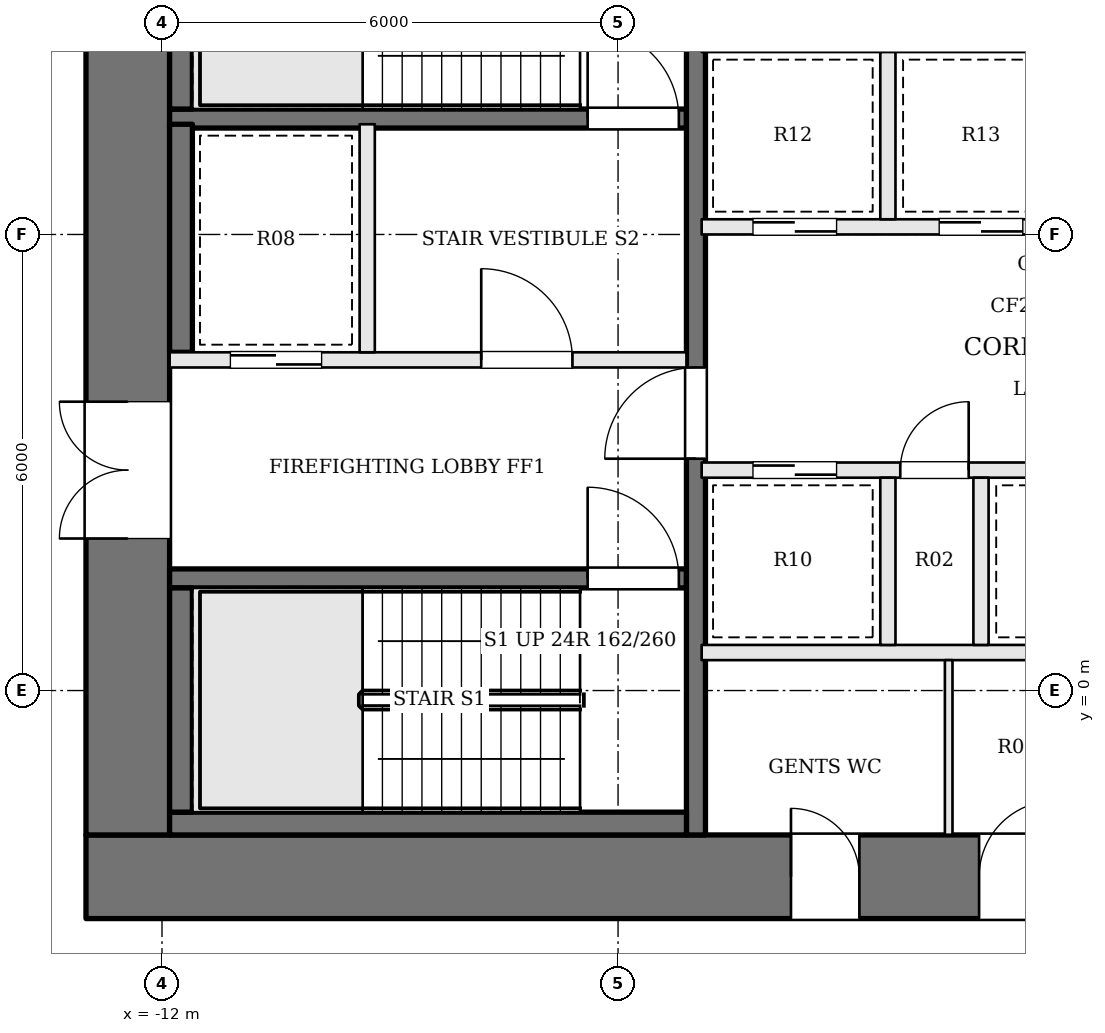
"""IFC4 building model, lengths in metres.
Left out: names, types, materials, properties, quantities, classifications, styles, units other than length and angle.
Written with IfcOpenShell. Run it as: python <this file> out.ifc"""

import sys

from ifc_helpers import new_model, si_unit, direction, frame, frame_2d, origin, place, context, subcontext, project, spatial, rectangle, extrude, element, fill, save


model = new_model("IFC4")
c1 = context("Model", 3, precision=1e-05, world=origin(), true_north=direction((0.0, 1.0)))
c2 = subcontext(c1, "Body", "Model", "MODEL_VIEW")
j1 = project(units=[si_unit("LENGTHUNIT", "METRE"), si_unit("PLANEANGLEUNIT", "RADIAN")], contexts=[c1])
p1 = place(None, origin())
s1 = spatial("IfcSite", under=j1, at=p1, CompositionType="ELEMENT")
p2 = place(p1, origin())
s2 = spatial("IfcBuilding", under=s1, at=p2, CompositionType="ELEMENT")
p3 = place(p2, frame((0.0, 0.0, 138.3)))
s3 = spatial("IfcBuildingStorey", under=s2, at=p3, CompositionType="ELEMENT", Elevation=138.3)
p4 = place(p3, frame((-13.0, -2.45, 0.0), z_axis=(0.0, 0.0, 1.0), x_axis=(1.0, 0.0, 0.0)))
e1 = element("IfcWall", 1, at=p4, inside=s3, PredefinedType="SHEAR", context=c2, shape_type="SweptSolid", body=[
    extrude(rectangle(XDim=26.0, YDim=1.1, at=frame_2d((13.0, 0.0))), origin(), (0.0, 0.0, 1.0), 3.9),
])
p5 = place(p4, frame((9.275, 0.0, 0.0)))
e2 = element("IfcOpeningElement", 2, at=p5, cuts=e1, PredefinedType="OPENING", context=c2, shape_type="SweptSolid", body=[
    extrude(rectangle(XDim=0.9, YDim=2.1, at=frame_2d((0.45, 1.05))), frame((0.0, 0.56, 0.0), z_axis=(0.0, -1.0, 0.0), x_axis=(1.0, 0.0, 0.0)), (0.0, 0.0, 1.0), 1.12),
])
p6 = place(p4, frame((11.75, 0.0, 0.0)))
e3 = element("IfcOpeningElement", 3, at=p6, cuts=e1, PredefinedType="OPENING", context=c2, shape_type="SweptSolid", body=[
    extrude(rectangle(XDim=1.0, YDim=2.1, at=frame_2d((0.5, 1.05))), frame((0.0, 0.56, 0.0), z_axis=(0.0, -1.0, 0.0), x_axis=(1.0, 0.0, 0.0)), (0.0, 0.0, 1.0), 1.12),
])
p7 = place(p4, frame((14.325, 0.0, 0.0)))
e4 = element("IfcOpeningElement", 4, at=p7, cuts=e1, PredefinedType="OPENING", context=c2, shape_type="SweptSolid", body=[
    extrude(rectangle(XDim=0.9, YDim=2.1, at=frame_2d((0.45, 1.05))), frame((0.0, 0.56, 0.0), z_axis=(0.0, -1.0, 0.0), x_axis=(1.0, 0.0, 0.0)), (0.0, 0.0, 1.0), 1.12),
])
p8 = place(p4, frame((16.7, 0.0, 0.0)))
e5 = element("IfcOpeningElement", 5, at=p8, cuts=e1, PredefinedType="OPENING", context=c2, shape_type="SweptSolid", body=[
    extrude(rectangle(XDim=0.9, YDim=2.1, at=frame_2d((0.45, 1.05))), frame((0.0, 0.56, 0.0), z_axis=(0.0, -1.0, 0.0), x_axis=(1.0, 0.0, 0.0)), (0.0, 0.0, 1.0), 1.12),
])
p9 = place(p3, frame((-12.45, -1.9, 0.0), z_axis=(0.0, 0.0, 1.0), x_axis=(0.0, 1.0, 0.0)))
e6 = element("IfcWall", 6, at=p9, inside=s3, PredefinedType="SHEAR", context=c2, shape_type="SweptSolid", body=[
    extrude(rectangle(XDim=12.8, YDim=1.1, at=frame_2d((6.4, 0.0))), origin(), (0.0, 0.0, 1.0), 3.9),
])
p10 = place(p9, frame((3.9, 0.0, 0.0)))
e7 = element("IfcOpeningElement", 7, at=p10, cuts=e6, PredefinedType="OPENING", context=c2, shape_type="SweptSolid", body=[
    extrude(rectangle(XDim=1.8, YDim=2.1, at=frame_2d((0.9, 1.05))), frame((0.0, 0.56, 0.0), z_axis=(0.0, -1.0, 0.0), x_axis=(1.0, 0.0, 0.0)), (0.0, 0.0, 1.0), 1.12),
])
p11 = place(p3, frame((-11.9, 1.475, 0.0), z_axis=(0.0, 0.0, 1.0), x_axis=(1.0, 0.0, 0.0)))
e8 = element("IfcWall", 8, at=p11, inside=s3, PredefinedType="SOLIDWALL", context=c2, shape_type="SweptSolid", body=[
    extrude(rectangle(XDim=6.8, YDim=0.25, at=frame_2d((3.4, 0.0))), origin(), (0.0, 0.0, 1.0), 3.7),
])
p12 = place(p11, frame((5.5, 0.0, 0.0)))
e9 = element("IfcOpeningElement", 9, at=p12, cuts=e8, PredefinedType="OPENING", context=c2, shape_type="SweptSolid", body=[
    extrude(rectangle(XDim=1.2, YDim=2.1, at=frame_2d((0.6, 1.05))), frame((0.0, 0.135, 0.0), z_axis=(0.0, -1.0, 0.0), x_axis=(1.0, 0.0, 0.0)), (0.0, 0.0, 1.0), 0.27),
])
p13 = place(p3, frame((-11.9, 4.35, 0.0), z_axis=(0.0, 0.0, 1.0), x_axis=(1.0, 0.0, 0.0)))
e10 = element("IfcWall", 10, at=p13, inside=s3, PredefinedType="SOLIDWALL", context=c2, shape_type="SweptSolid", body=[
    extrude(rectangle(XDim=6.8, YDim=0.2, at=frame_2d((3.4, 0.0))), origin(), (0.0, 0.0, 1.0), 3.7),
])
p14 = place(p13, frame((4.1, 0.0, 0.0)))
e11 = element("IfcOpeningElement", 11, at=p14, cuts=e10, PredefinedType="OPENING", context=c2, shape_type="SweptSolid", body=[
    extrude(rectangle(XDim=1.2, YDim=2.1, at=frame_2d((0.6, 1.05))), frame((0.0, 0.11, 0.0), z_axis=(0.0, -1.0, 0.0), x_axis=(1.0, 0.0, 0.0)), (0.0, 0.0, 1.0), 0.22),
])
p15 = place(p13, frame((0.8, 0.0, 0.0)))
e12 = element("IfcOpeningElement", 12, at=p15, cuts=e10, PredefinedType="OPENING", context=c2, shape_type="SweptSolid", body=[
    extrude(rectangle(XDim=1.2, YDim=2.1, at=frame_2d((0.6, 1.05))), frame((0.0, 0.11, 0.0), z_axis=(0.0, -1.0, 0.0), x_axis=(1.0, 0.0, 0.0)), (0.0, 0.0, 1.0), 0.22),
])
p16 = place(p3, frame((-11.9, 7.525, 0.0), z_axis=(0.0, 0.0, 1.0), x_axis=(1.0, 0.0, 0.0)))
e13 = element("IfcWall", 13, at=p16, inside=s3, PredefinedType="SOLIDWALL", context=c2, shape_type="SweptSolid", body=[
    extrude(rectangle(XDim=6.8, YDim=0.25, at=frame_2d((3.4, 0.0))), origin(), (0.0, 0.0, 1.0), 3.7),
])
p17 = place(p16, frame((5.5, 0.0, 0.0)))
e14 = element("IfcOpeningElement", 14, at=p17, cuts=e13, PredefinedType="OPENING", context=c2, shape_type="SweptSolid", body=[
    extrude(rectangle(XDim=1.2, YDim=2.1, at=frame_2d((0.6, 1.05))), frame((0.0, 0.135, 0.0), z_axis=(0.0, -1.0, 0.0), x_axis=(1.0, 0.0, 0.0)), (0.0, 0.0, 1.0), 0.27),
])
p18 = place(p3, frame((-9.3, 4.45, 0.0), z_axis=(0.0, 0.0, 1.0), x_axis=(0.0, 1.0, 0.0)))
e15 = element("IfcWall", 15, at=p18, inside=s3, PredefinedType="SOLIDWALL", context=c2, shape_type="SweptSolid", body=[
    extrude(rectangle(XDim=3.0, YDim=0.2, at=frame_2d((1.5, 0.0))), origin(), (0.0, 0.0, 1.0), 3.7),
])
p19 = place(p3, frame((-4.975, -1.9, 0.0), z_axis=(0.0, 0.0, 1.0), x_axis=(0.0, 1.0, 0.0)))
e16 = element("IfcWall", 16, at=p19, inside=s3, PredefinedType="SOLIDWALL", context=c2, shape_type="SweptSolid", body=[
    extrude(rectangle(XDim=12.8, YDim=0.25, at=frame_2d((6.4, 0.0))), origin(), (0.0, 0.0, 1.0), 3.7),
])
p20 = place(p19, frame((4.95, 0.0, 0.0)))
e17 = element("IfcOpeningElement", 17, at=p20, cuts=e16, PredefinedType="OPENING", context=c2, shape_type="SweptSolid", body=[
    extrude(rectangle(XDim=1.2, YDim=2.1, at=frame_2d((0.6, 1.05))), frame((0.0, 0.135, 0.0), z_axis=(0.0, -1.0, 0.0), x_axis=(1.0, 0.0, 0.0)), (0.0, 0.0, 1.0), 0.27),
])
p21 = place(p3, frame((-11.9, -1.75, 0.0), z_axis=(0.0, 0.0, 1.0), x_axis=(1.0, 0.0, 0.0)))
e18 = element("IfcWall", 18, at=p21, inside=s3, PredefinedType="SOLIDWALL", context=c2, shape_type="SweptSolid", body=[
    extrude(rectangle(XDim=6.8, YDim=0.3, at=frame_2d((3.4, 0.0))), origin(), (0.0, 0.0, 1.0), 3.7),
])
p22 = place(p3, frame((-11.75, -1.6, 0.0), z_axis=(0.0, 0.0, 1.0), x_axis=(0.0, 1.0, 0.0)))
e19 = element("IfcWall", 19, at=p22, inside=s3, PredefinedType="SOLIDWALL", context=c2, shape_type="SweptSolid", body=[
    extrude(rectangle(XDim=2.95, YDim=0.3, at=frame_2d((1.475, 0.0))), origin(), (0.0, 0.0, 1.0), 3.7),
])
p23 = place(p3, frame((-11.75, 4.45, 0.0), z_axis=(0.0, 0.0, 1.0), x_axis=(0.0, 1.0, 0.0)))
e20 = element("IfcWall", 20, at=p23, inside=s3, PredefinedType="SOLIDWALL", context=c2, shape_type="SweptSolid", body=[
    extrude(rectangle(XDim=3.0, YDim=0.3, at=frame_2d((1.5, 0.0))), origin(), (0.0, 0.0, 1.0), 3.7),
])
p24 = place(p3, frame((-11.75, 7.65, 0.0), z_axis=(0.0, 0.0, 1.0), x_axis=(0.0, 1.0, 0.0)))
e21 = element("IfcWall", 21, at=p24, inside=s3, PredefinedType="SOLIDWALL", context=c2, shape_type="SweptSolid", body=[
    extrude(rectangle(XDim=2.95, YDim=0.3, at=frame_2d((1.475, 0.0))), origin(), (0.0, 0.0, 1.0), 3.7),
])
p25 = place(p3, frame((-4.9, 0.5, 0.0), z_axis=(0.0, 0.0, 1.0), x_axis=(1.0, 0.0, 0.0)))
e22 = element("IfcWall", 22, at=p25, inside=s3, PredefinedType="SOLIDWALL", context=c2, shape_type="SweptSolid", body=[
    extrude(rectangle(XDim=9.8, YDim=0.2, at=frame_2d((4.9, 0.0))), origin(), (0.0, 0.0, 1.0), 3.7),
])
p26 = place(p3, frame((-4.9, 2.9, 0.0), z_axis=(0.0, 0.0, 1.0), x_axis=(1.0, 0.0, 0.0)))
e23 = element("IfcWall", 23, at=p26, inside=s3, PredefinedType="SOLIDWALL", context=c2, shape_type="SweptSolid", body=[
    extrude(rectangle(XDim=9.8, YDim=0.2, at=frame_2d((4.9, 0.0))), origin(), (0.0, 0.0, 1.0), 3.7),
])
p27 = place(p26, frame((0.675, 0.0, 0.0)))
e24 = element("IfcOpeningElement", 24, at=p27, cuts=e23, PredefinedType="OPENING", context=c2, shape_type="SweptSolid", body=[
    extrude(rectangle(XDim=1.1, YDim=2.1, at=frame_2d((0.55, 1.05))), frame((0.0, 0.11, 0.0), z_axis=(0.0, -1.0, 0.0), x_axis=(1.0, 0.0, 0.0)), (0.0, 0.0, 1.0), 0.22),
])
p28 = place(p26, frame((2.613, 0.0, 0.0)))
e25 = element("IfcOpeningElement", 25, at=p28, cuts=e23, PredefinedType="OPENING", context=c2, shape_type="SweptSolid", body=[
    extrude(rectangle(XDim=0.9, YDim=2.1, at=frame_2d((0.45, 1.05))), frame((0.0, 0.11, 0.0), z_axis=(0.0, -1.0, 0.0), x_axis=(1.0, 0.0, 0.0)), (0.0, 0.0, 1.0), 0.22),
])
p29 = place(p26, frame((4.35, 0.0, 0.0)))
e26 = element("IfcOpeningElement", 26, at=p29, cuts=e23, PredefinedType="OPENING", context=c2, shape_type="SweptSolid", body=[
    extrude(rectangle(XDim=1.1, YDim=2.1, at=frame_2d((0.55, 1.05))), frame((0.0, 0.11, 0.0), z_axis=(0.0, -1.0, 0.0), x_axis=(1.0, 0.0, 0.0)), (0.0, 0.0, 1.0), 0.22),
])
p30 = place(p26, frame((7.463, 0.0, 0.0)))
e27 = element("IfcOpeningElement", 27, at=p30, cuts=e23, PredefinedType="OPENING", context=c2, shape_type="SweptSolid", body=[
    extrude(rectangle(XDim=1.0, YDim=2.1, at=frame_2d((0.5, 1.05))), frame((0.0, 0.11, 0.0), z_axis=(0.0, -1.0, 0.0), x_axis=(1.0, 0.0, 0.0)), (0.0, 0.0, 1.0), 0.22),
])
p31 = place(p3, frame((-4.9, 6.1, 0.0), z_axis=(0.0, 0.0, 1.0), x_axis=(1.0, 0.0, 0.0)))
e28 = element("IfcWall", 28, at=p31, inside=s3, PredefinedType="SOLIDWALL", context=c2, shape_type="SweptSolid", body=[
    extrude(rectangle(XDim=9.8, YDim=0.2, at=frame_2d((4.9, 0.0))), origin(), (0.0, 0.0, 1.0), 3.7),
])
p32 = place(p31, frame((0.675, 0.0, 0.0)))
e29 = element("IfcOpeningElement", 29, at=p32, cuts=e28, PredefinedType="OPENING", context=c2, shape_type="SweptSolid", body=[
    extrude(rectangle(XDim=1.1, YDim=2.1, at=frame_2d((0.55, 1.05))), frame((0.0, 0.11, 0.0), z_axis=(0.0, -1.0, 0.0), x_axis=(1.0, 0.0, 0.0)), (0.0, 0.0, 1.0), 0.22),
])
p33 = place(p31, frame((3.125, 0.0, 0.0)))
e30 = element("IfcOpeningElement", 30, at=p33, cuts=e28, PredefinedType="OPENING", context=c2, shape_type="SweptSolid", body=[
    extrude(rectangle(XDim=1.1, YDim=2.1, at=frame_2d((0.55, 1.05))), frame((0.0, 0.11, 0.0), z_axis=(0.0, -1.0, 0.0), x_axis=(1.0, 0.0, 0.0)), (0.0, 0.0, 1.0), 0.22),
])
p34 = place(p31, frame((5.575, 0.0, 0.0)))
e31 = element("IfcOpeningElement", 31, at=p34, cuts=e28, PredefinedType="OPENING", context=c2, shape_type="SweptSolid", body=[
    extrude(rectangle(XDim=1.1, YDim=2.1, at=frame_2d((0.55, 1.05))), frame((0.0, 0.11, 0.0), z_axis=(0.0, -1.0, 0.0), x_axis=(1.0, 0.0, 0.0)), (0.0, 0.0, 1.0), 0.22),
])
p35 = place(p31, frame((8.025, 0.0, 0.0)))
e32 = element("IfcOpeningElement", 32, at=p35, cuts=e28, PredefinedType="OPENING", context=c2, shape_type="SweptSolid", body=[
    extrude(rectangle(XDim=1.1, YDim=2.1, at=frame_2d((0.55, 1.05))), frame((0.0, 0.11, 0.0), z_axis=(0.0, -1.0, 0.0), x_axis=(1.0, 0.0, 0.0)), (0.0, 0.0, 1.0), 0.22),
])
for number, where, z_axis, x_axis in (
    (33, (-2.45, 0.6, 0.0), (0.0, 0.0, 1.0), (0.0, 1.0, 0.0)),
    (34, (-1.225, 0.6, 0.0), (0.0, 0.0, 1.0), (0.0, 1.0, 0.0)),
    (35, (-2.45, 6.2, 0.0), (0.0, 0.0, 1.0), (0.0, 1.0, 0.0)),
):
    element("IfcWall", number, at=place(p3, frame(where, z_axis=z_axis, x_axis=x_axis)), inside=s3, PredefinedType="SOLIDWALL", context=c2, shape_type="SweptSolid", body=[
        extrude(rectangle(XDim=2.2, YDim=0.2, at=frame_2d((1.1, 0.0))), origin(), (0.0, 0.0, 1.0), 3.7),
    ])
p36 = place(p3, frame((-1.65, -1.9, 0.0), z_axis=(0.0, 0.0, 1.0), x_axis=(0.0, 1.0, 0.0)))
e36 = element("IfcWall", 36, at=p36, inside=s3, PredefinedType="PARTITIONING", context=c2, shape_type="SweptSolid", body=[
    extrude(rectangle(XDim=2.3, YDim=0.1, at=frame_2d((1.15, 0.0))), origin(), (0.0, 0.0, 1.0), 3.7),
])
p37 = place(p10, origin())
e37 = element("IfcDoor", 37, at=p37, inside=s3, OperationType="DOUBLE_DOOR_SINGLE_SWING", PredefinedType="DOOR", context=c2, shape_type="SweptSolid", body=[
    extrude(rectangle(XDim=1.8, YDim=2.1, at=frame_2d((0.9, 1.05))), frame((0.0, 0.025, 0.0), z_axis=(0.0, -1.0, 0.0), x_axis=(1.0, 0.0, 0.0)), (0.0, 0.0, 1.0), 0.05),
])
fill(e7, e37)
p38 = place(p20, origin())
e38 = element("IfcDoor", 38, at=p38, inside=s3, OperationType="SINGLE_SWING_LEFT", PredefinedType="DOOR", context=c2, shape_type="SweptSolid", body=[
    extrude(rectangle(XDim=1.2, YDim=2.1, at=frame_2d((0.6, 1.05))), frame((0.0, 0.025, 0.0), z_axis=(0.0, -1.0, 0.0), x_axis=(1.0, 0.0, 0.0)), (0.0, 0.0, 1.0), 0.05),
])
fill(e17, e38)
p39 = place(p14, origin())
e39 = element("IfcDoor", 39, at=p39, inside=s3, OperationType="SINGLE_SWING_LEFT", PredefinedType="DOOR", context=c2, shape_type="SweptSolid", body=[
    extrude(rectangle(XDim=1.2, YDim=2.1, at=frame_2d((0.6, 1.05))), frame((0.0, 0.025, 0.0), z_axis=(0.0, -1.0, 0.0), x_axis=(1.0, 0.0, 0.0)), (0.0, 0.0, 1.0), 0.05),
])
fill(e11, e39)
p40 = place(p12, origin())
e40 = element("IfcDoor", 40, at=p40, inside=s3, OperationType="SINGLE_SWING_LEFT", PredefinedType="DOOR", context=c2, shape_type="SweptSolid", body=[
    extrude(rectangle(XDim=1.2, YDim=2.1, at=frame_2d((0.6, 1.05))), frame((0.0, 0.025, 0.0), z_axis=(0.0, -1.0, 0.0), x_axis=(1.0, 0.0, 0.0)), (0.0, 0.0, 1.0), 0.05),
])
fill(e9, e40)
p41 = place(p17, origin())
e41 = element("IfcDoor", 41, at=p41, inside=s3, OperationType="SINGLE_SWING_LEFT", PredefinedType="DOOR", context=c2, shape_type="SweptSolid", body=[
    extrude(rectangle(XDim=1.2, YDim=2.1, at=frame_2d((0.6, 1.05))), frame((0.0, 0.025, 0.0), z_axis=(0.0, -1.0, 0.0), x_axis=(1.0, 0.0, 0.0)), (0.0, 0.0, 1.0), 0.05),
])
fill(e14, e41)
p42 = place(p15, origin())
e42 = element("IfcDoor", 42, at=p42, inside=s3, OperationType="SLIDING_TO_RIGHT", PredefinedType="DOOR", context=c2, shape_type="SweptSolid", body=[
    extrude(rectangle(XDim=1.2, YDim=2.1, at=frame_2d((0.6, 1.05))), frame((0.0, 0.025, 0.0), z_axis=(0.0, -1.0, 0.0), x_axis=(1.0, 0.0, 0.0)), (0.0, 0.0, 1.0), 0.05),
])
fill(e12, e42)
p43 = place(p27, origin())
e43 = element("IfcDoor", 43, at=p43, inside=s3, OperationType="SLIDING_TO_RIGHT", PredefinedType="DOOR", context=c2, shape_type="SweptSolid", body=[
    extrude(rectangle(XDim=1.1, YDim=2.1, at=frame_2d((0.55, 1.05))), frame((0.0, 0.025, 0.0), z_axis=(0.0, -1.0, 0.0), x_axis=(1.0, 0.0, 0.0)), (0.0, 0.0, 1.0), 0.05),
])
fill(e24, e43)
p44 = place(p28, origin())
e44 = element("IfcDoor", 44, at=p44, inside=s3, OperationType="SINGLE_SWING_RIGHT", PredefinedType="DOOR", context=c2, shape_type="SweptSolid", body=[
    extrude(rectangle(XDim=0.9, YDim=2.1, at=frame_2d((0.45, 1.05))), frame((0.0, 0.025, 0.0), z_axis=(0.0, -1.0, 0.0), x_axis=(1.0, 0.0, 0.0)), (0.0, 0.0, 1.0), 0.05),
])
fill(e25, e44)
p45 = place(p32, origin())
e45 = element("IfcDoor", 45, at=p45, inside=s3, OperationType="SLIDING_TO_RIGHT", PredefinedType="DOOR", context=c2, shape_type="SweptSolid", body=[
    extrude(rectangle(XDim=1.1, YDim=2.1, at=frame_2d((0.55, 1.05))), frame((0.0, 0.025, 0.0), z_axis=(0.0, -1.0, 0.0), x_axis=(1.0, 0.0, 0.0)), (0.0, 0.0, 1.0), 0.05),
])
fill(e29, e45)
p46 = place(p33, origin())
e46 = element("IfcDoor", 46, at=p46, inside=s3, OperationType="SLIDING_TO_LEFT", PredefinedType="DOOR", context=c2, shape_type="SweptSolid", body=[
    extrude(rectangle(XDim=1.1, YDim=2.1, at=frame_2d((0.55, 1.05))), frame((0.0, 0.025, 0.0), z_axis=(0.0, -1.0, 0.0), x_axis=(1.0, 0.0, 0.0)), (0.0, 0.0, 1.0), 0.05),
])
fill(e30, e46)
p47 = place(p5, origin())
e47 = element("IfcDoor", 47, at=p47, inside=s3, OperationType="SINGLE_SWING_LEFT", PredefinedType="DOOR", context=c2, shape_type="SweptSolid", body=[
    extrude(rectangle(XDim=0.9, YDim=2.1, at=frame_2d((0.45, 1.05))), frame((0.0, 0.025, 0.0), z_axis=(0.0, -1.0, 0.0), x_axis=(1.0, 0.0, 0.0)), (0.0, 0.0, 1.0), 0.05),
])
fill(e2, e47)
p48 = place(p6, origin())
e48 = element("IfcDoor", 48, at=p48, inside=s3, OperationType="SINGLE_SWING_RIGHT", PredefinedType="DOOR", context=c2, shape_type="SweptSolid", body=[
    extrude(rectangle(XDim=1.0, YDim=2.1, at=frame_2d((0.5, 1.05))), frame((0.0, 0.025, 0.0), z_axis=(0.0, -1.0, 0.0), x_axis=(1.0, 0.0, 0.0)), (0.0, 0.0, 1.0), 0.05),
])
fill(e3, e48)
save(model, sys.argv[1])
